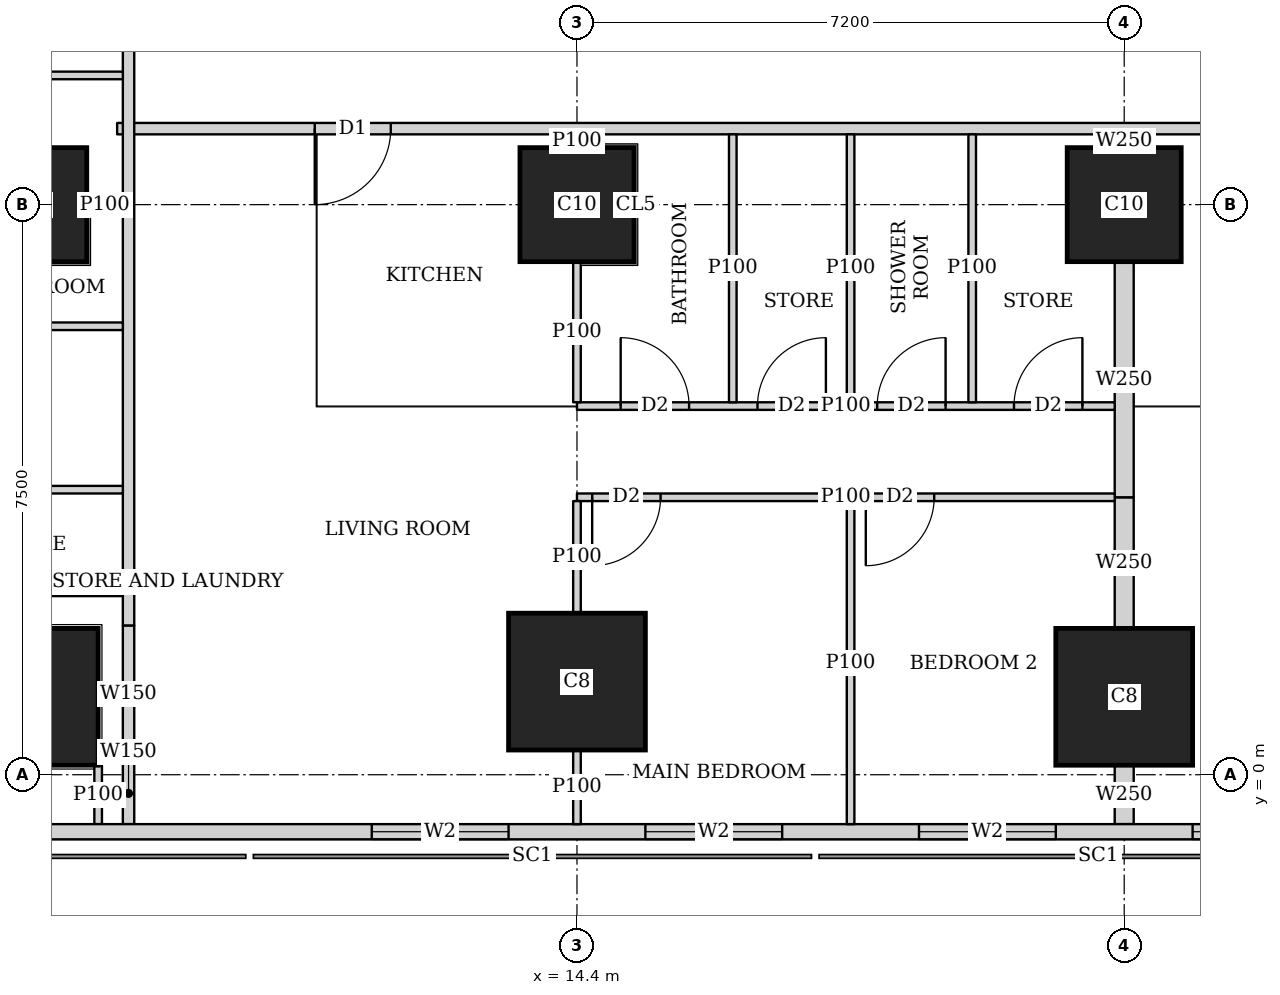
"""IFC4 building model, lengths in metres.
Left out: names, types, materials, properties, quantities, classifications, styles, units other than length and angle.
Written with IfcOpenShell. Run it as: python <this file> out.ifc"""

import sys

from ifc_helpers import new_model, si_unit, direction, frame, frame_2d, origin, origin_2d, place, context, subcontext, project, spatial, rectangle, extrude, element, fill, save


model = new_model("IFC4")
c1 = context("Model", 3, precision=1e-05, world=origin(), true_north=direction((0.0, 1.0)))
c2 = subcontext(c1, "Body", "Model", "MODEL_VIEW")
j1 = project(units=[si_unit("LENGTHUNIT", "METRE"), si_unit("PLANEANGLEUNIT", "RADIAN")], contexts=[c1])
p1 = place(None, origin())
s1 = spatial("IfcSite", under=j1, at=p1, CompositionType="ELEMENT")
p2 = place(p1, origin())
s2 = spatial("IfcBuilding", under=s1, at=p2, CompositionType="ELEMENT")
p3 = place(p2, frame((0.0, 0.0, 180.8)))
s3 = spatial("IfcBuildingStorey", under=s2, at=p3, CompositionType="ELEMENT", Elevation=180.8)
for number, where, z_axis, x_axis in (
    (1, (7.2, 1.025, 0.0), (0.0, 0.0, 1.0), (1.0, 0.0, 0.0)),
    (2, (14.4, 1.225, 0.0), (0.0, 0.0, 1.0), (1.0, 0.0, 0.0)),
    (3, (21.6, 1.025, 0.0), (0.0, 0.0, 1.0), (1.0, 0.0, 0.0)),
):
    element("IfcColumn", number, at=place(p3, frame(where, z_axis=z_axis, x_axis=x_axis)), inside=s3, PredefinedType="COLUMN", context=c2, shape_type="SweptSolid", body=[
        extrude(rectangle(XDim=1.8, YDim=1.8, at=origin_2d()), origin(), (0.0, 0.0, 1.0), 3.75),
    ])
for number, where, z_axis, x_axis in (
    (4, (7.2, 7.5, 0.0), (0.0, 0.0, 1.0), (1.0, 0.0, 0.0)),
    (5, (14.4, 7.5, 0.0), (0.0, 0.0, 1.0), (1.0, 0.0, 0.0)),
    (6, (21.6, 7.5, 0.0), (0.0, 0.0, 1.0), (1.0, 0.0, 0.0)),
):
    element("IfcColumn", number, at=place(p3, frame(where, z_axis=z_axis, x_axis=x_axis)), inside=s3, PredefinedType="COLUMN", context=c2, shape_type="SweptSolid", body=[
        extrude(rectangle(XDim=1.5, YDim=1.5, at=origin_2d()), origin(), (0.0, 0.0, 1.0), 3.75),
    ])
p4 = place(p3, frame((2.163, -0.75, 0.0), z_axis=(0.0, 0.0, 1.0), x_axis=(1.0, 0.0, 0.0)))
e7 = element("IfcWall", 7, at=p4, inside=s3, PredefinedType="SOLIDWALL", context=c2, shape_type="SweptSolid", body=[
    extrude(rectangle(XDim=45.628, YDim=0.2, at=frame_2d((22.814, 0.0))), origin(), (0.0, 0.0, 1.0), 3.5),
])
p5 = place(p4, frame((9.537, 0.0, 0.9)))
e8 = element("IfcOpeningElement", 8, at=p5, cuts=e7, PredefinedType="OPENING", context=c2, shape_type="SweptSolid", body=[
    extrude(rectangle(XDim=1.8, YDim=1.5, at=frame_2d((0.9, 0.75))), frame((0.0, 0.11, 0.0), z_axis=(0.0, -1.0, 0.0), x_axis=(1.0, 0.0, 0.0)), (0.0, 0.0, 1.0), 0.22),
])
p6 = place(p4, frame((13.137, 0.0, 0.9)))
e9 = element("IfcOpeningElement", 9, at=p6, cuts=e7, PredefinedType="OPENING", context=c2, shape_type="SweptSolid", body=[
    extrude(rectangle(XDim=1.8, YDim=1.5, at=frame_2d((0.9, 0.75))), frame((0.0, 0.11, 0.0), z_axis=(0.0, -1.0, 0.0), x_axis=(1.0, 0.0, 0.0)), (0.0, 0.0, 1.0), 0.22),
])
p7 = place(p4, frame((16.737, 0.0, 0.9)))
e10 = element("IfcOpeningElement", 10, at=p7, cuts=e7, PredefinedType="OPENING", context=c2, shape_type="SweptSolid", body=[
    extrude(rectangle(XDim=1.8, YDim=1.5, at=frame_2d((0.9, 0.75))), frame((0.0, 0.11, 0.0), z_axis=(0.0, -1.0, 0.0), x_axis=(1.0, 0.0, 0.0)), (0.0, 0.0, 1.0), 0.22),
])
p8 = place(p4, frame((20.337, 0.0, 0.9)))
e11 = element("IfcOpeningElement", 11, at=p8, cuts=e7, PredefinedType="OPENING", context=c2, shape_type="SweptSolid", body=[
    extrude(rectangle(XDim=1.8, YDim=1.5, at=frame_2d((0.9, 0.75))), frame((0.0, 0.11, 0.0), z_axis=(0.0, -1.0, 0.0), x_axis=(1.0, 0.0, 0.0)), (0.0, 0.0, 1.0), 0.22),
])
p9 = place(p4, frame((23.937, 0.0, 0.9)))
e12 = element("IfcOpeningElement", 12, at=p9, cuts=e7, PredefinedType="OPENING", context=c2, shape_type="SweptSolid", body=[
    extrude(rectangle(XDim=1.8, YDim=1.5, at=frame_2d((0.9, 0.75))), frame((0.0, 0.11, 0.0), z_axis=(0.0, -1.0, 0.0), x_axis=(1.0, 0.0, 0.0)), (0.0, 0.0, 1.0), 0.22),
])
p10 = place(p4, frame((27.537, 0.0, 0.9)))
e13 = element("IfcOpeningElement", 13, at=p10, cuts=e7, PredefinedType="OPENING", context=c2, shape_type="SweptSolid", body=[
    extrude(rectangle(XDim=1.8, YDim=1.5, at=frame_2d((0.9, 0.75))), frame((0.0, 0.11, 0.0), z_axis=(0.0, -1.0, 0.0), x_axis=(1.0, 0.0, 0.0)), (0.0, 0.0, 1.0), 0.22),
])
p11 = place(p4, frame((31.137, 0.0, 0.9)))
e14 = element("IfcOpeningElement", 14, at=p11, cuts=e7, PredefinedType="OPENING", context=c2, shape_type="SweptSolid", body=[
    extrude(rectangle(XDim=1.8, YDim=1.5, at=frame_2d((0.9, 0.75))), frame((0.0, 0.11, 0.0), z_axis=(0.0, -1.0, 0.0), x_axis=(1.0, 0.0, 0.0)), (0.0, 0.0, 1.0), 0.22),
])
p12 = place(p4, frame((34.737, 0.0, 0.9)))
e15 = element("IfcOpeningElement", 15, at=p12, cuts=e7, PredefinedType="OPENING", context=c2, shape_type="SweptSolid", body=[
    extrude(rectangle(XDim=1.8, YDim=1.5, at=frame_2d((0.9, 0.75))), frame((0.0, 0.11, 0.0), z_axis=(0.0, -1.0, 0.0), x_axis=(1.0, 0.0, 0.0)), (0.0, 0.0, 1.0), 0.22),
])
p13 = place(p3, frame((8.5, -0.65, 0.0), z_axis=(0.0, 0.0, 1.0), x_axis=(0.0, 1.0, 0.0)))
e16 = element("IfcWall", 16, at=p13, inside=s3, PredefinedType="SOLIDWALL", context=c2, shape_type="SweptSolid", body=[
    extrude(rectangle(XDim=0.809, YDim=0.15, at=frame_2d((0.404, 0.0))), origin(), (0.0, 0.0, 1.0), 3.5),
])
p14 = place(p3, frame((8.5, 0.159, 0.0), z_axis=(0.0, 0.0, 1.0), x_axis=(0.0, 1.0, 0.0)))
e17 = element("IfcWall", 17, at=p14, inside=s3, PredefinedType="SOLIDWALL", context=c2, shape_type="SweptSolid", body=[
    extrude(rectangle(XDim=1.805, YDim=0.15, at=frame_2d((0.903, 0.0))), origin(), (0.0, 0.0, 1.0), 2.1),
])
p15 = place(p3, frame((8.5, 1.964, 0.0), z_axis=(0.0, 0.0, 1.0), x_axis=(0.0, 1.0, 0.0)))
e18 = element("IfcWall", 18, at=p15, inside=s3, PredefinedType="SOLIDWALL", context=c2, shape_type="SweptSolid", body=[
    extrude(rectangle(XDim=41.097, YDim=0.15, at=frame_2d((20.548, 0.0))), origin(), (0.0, 0.0, 1.0), 3.5),
])
p16 = place(p15, frame((10.661, 0.0, 0.0)))
e19 = element("IfcOpeningElement", 19, at=p16, cuts=e18, PredefinedType="OPENING", context=c2, shape_type="SweptSolid", body=[
    extrude(rectangle(XDim=1.0, YDim=2.1, at=frame_2d((0.5, 1.05))), frame((0.0, 0.085, 0.0), z_axis=(0.0, -1.0, 0.0), x_axis=(1.0, 0.0, 0.0)), (0.0, 0.0, 1.0), 0.17),
])
p17 = place(p15, frame((14.411, 0.0, 0.0)))
e20 = element("IfcOpeningElement", 20, at=p17, cuts=e18, PredefinedType="OPENING", context=c2, shape_type="SweptSolid", body=[
    extrude(rectangle(XDim=1.0, YDim=2.1, at=frame_2d((0.5, 1.05))), frame((0.0, 0.085, 0.0), z_axis=(0.0, -1.0, 0.0), x_axis=(1.0, 0.0, 0.0)), (0.0, 0.0, 1.0), 0.17),
])
p18 = place(p15, frame((21.911, 0.0, 0.0)))
e21 = element("IfcOpeningElement", 21, at=p18, cuts=e18, PredefinedType="OPENING", context=c2, shape_type="SweptSolid", body=[
    extrude(rectangle(XDim=1.0, YDim=2.1, at=frame_2d((0.5, 1.05))), frame((0.0, 0.085, 0.0), z_axis=(0.0, -1.0, 0.0), x_axis=(1.0, 0.0, 0.0)), (0.0, 0.0, 1.0), 0.17),
])
p19 = place(p15, frame((33.161, 0.0, 0.0)))
e22 = element("IfcOpeningElement", 22, at=p19, cuts=e18, PredefinedType="OPENING", context=c2, shape_type="SweptSolid", body=[
    extrude(rectangle(XDim=1.0, YDim=2.1, at=frame_2d((0.5, 1.05))), frame((0.0, 0.085, 0.0), z_axis=(0.0, -1.0, 0.0), x_axis=(1.0, 0.0, 0.0)), (0.0, 0.0, 1.0), 0.17),
])
p20 = place(p3, frame((40.053, 8.5, 0.0), z_axis=(0.0, 0.0, 1.0), x_axis=(-1.0, 0.0, 0.0)))
e23 = element("IfcWall", 23, at=p20, inside=s3, PredefinedType="SOLIDWALL", context=c2, shape_type="SweptSolid", body=[
    extrude(rectangle(XDim=31.703, YDim=0.15, at=frame_2d((15.852, 0.0))), origin(), (0.0, 0.0, 1.0), 3.5),
])
p21 = place(p20, frame((28.103, 0.0, 0.0)))
e24 = element("IfcOpeningElement", 24, at=p21, cuts=e23, PredefinedType="OPENING", context=c2, shape_type="SweptSolid", body=[
    extrude(rectangle(XDim=1.0, YDim=2.1, at=frame_2d((0.5, 1.05))), frame((0.0, 0.085, 0.0), z_axis=(0.0, -1.0, 0.0), x_axis=(1.0, 0.0, 0.0)), (0.0, 0.0, 1.0), 0.17),
])
p22 = place(p20, frame((15.953, 0.0, 0.0)))
e25 = element("IfcOpeningElement", 25, at=p22, cuts=e23, PredefinedType="OPENING", context=c2, shape_type="SweptSolid", body=[
    extrude(rectangle(XDim=1.0, YDim=2.1, at=frame_2d((0.5, 1.05))), frame((0.0, 0.085, 0.0), z_axis=(0.0, -1.0, 0.0), x_axis=(1.0, 0.0, 0.0)), (0.0, 0.0, 1.0), 0.17),
])
p23 = place(p20, frame((8.753, 0.0, 0.0)))
e26 = element("IfcOpeningElement", 26, at=p23, cuts=e23, PredefinedType="OPENING", context=c2, shape_type="SweptSolid", body=[
    extrude(rectangle(XDim=1.0, YDim=2.1, at=frame_2d((0.5, 1.05))), frame((0.0, 0.085, 0.0), z_axis=(0.0, -1.0, 0.0), x_axis=(1.0, 0.0, 0.0)), (0.0, 0.0, 1.0), 0.17),
])
p24 = place(p3, frame((8.1, 0.124, 0.0), z_axis=(0.0, 0.0, 1.0), x_axis=(0.0, -1.0, 0.0)))
e27 = element("IfcWall", 27, at=p24, inside=s3, PredefinedType="PARTITIONING", context=c2, shape_type="SweptSolid", body=[
    extrude(rectangle(XDim=0.774, YDim=0.1, at=frame_2d((0.387, 0.0))), origin(), (0.0, 0.0, 1.0), 3.5),
])
p25 = place(p3, frame((4.9, 3.75, 0.0), z_axis=(0.0, 0.0, 1.0), x_axis=(1.0, 0.0, 0.0)))
e28 = element("IfcWall", 28, at=p25, inside=s3, PredefinedType="PARTITIONING", context=c2, shape_type="SweptSolid", body=[
    extrude(rectangle(XDim=3.525, YDim=0.1, at=frame_2d((1.763, 0.0))), origin(), (0.0, 0.0, 1.0), 3.5),
])
p26 = place(p3, frame((7.951, 7.5, 0.0), z_axis=(0.0, 0.0, 1.0), x_axis=(1.0, 0.0, 0.0)))
e29 = element("IfcWall", 29, at=p26, inside=s3, PredefinedType="PARTITIONING", context=c2, shape_type="SweptSolid", body=[
    extrude(rectangle(XDim=0.474, YDim=0.1, at=frame_2d((0.237, 0.0))), origin(), (0.0, 0.0, 1.0), 3.5),
])
for number, where, z_axis, x_axis in (
    (30, (4.9, 9.2, 0.0), (0.0, 0.0, 1.0), (1.0, 0.0, 0.0)),
    (31, (4.9, 5.9, 0.0), (0.0, 0.0, 1.0), (1.0, 0.0, 0.0)),
):
    element("IfcWall", number, at=place(p3, frame(where, z_axis=z_axis, x_axis=x_axis)), inside=s3, PredefinedType="PARTITIONING", context=c2, shape_type="SweptSolid", body=[
        extrude(rectangle(XDim=3.525, YDim=0.1, at=frame_2d((1.763, 0.0))), origin(), (0.0, 0.0, 1.0), 3.5),
    ])
p27 = place(p3, frame((21.475, 3.65, 0.0), z_axis=(0.0, 0.0, 1.0), x_axis=(-1.0, 0.0, 0.0)))
e32 = element("IfcWall", 32, at=p27, inside=s3, PredefinedType="PARTITIONING", context=c2, shape_type="SweptSolid", body=[
    extrude(rectangle(XDim=7.075, YDim=0.1, at=frame_2d((3.538, 0.0))), origin(), (0.0, 0.0, 1.0), 3.5),
])
p28 = place(p27, frame((5.975, 0.0, 0.0)))
e33 = element("IfcOpeningElement", 33, at=p28, cuts=e32, PredefinedType="OPENING", context=c2, shape_type="SweptSolid", body=[
    extrude(rectangle(XDim=0.9, YDim=2.1, at=frame_2d((0.45, 1.05))), frame((0.0, 0.06, 0.0), z_axis=(0.0, -1.0, 0.0), x_axis=(1.0, 0.0, 0.0)), (0.0, 0.0, 1.0), 0.12),
])
p29 = place(p27, frame((2.375, 0.0, 0.0)))
e34 = element("IfcOpeningElement", 34, at=p29, cuts=e32, PredefinedType="OPENING", context=c2, shape_type="SweptSolid", body=[
    extrude(rectangle(XDim=0.9, YDim=2.1, at=frame_2d((0.45, 1.05))), frame((0.0, 0.06, 0.0), z_axis=(0.0, -1.0, 0.0), x_axis=(1.0, 0.0, 0.0)), (0.0, 0.0, 1.0), 0.12),
])
p30 = place(p3, frame((21.475, 4.85, 0.0), z_axis=(0.0, 0.0, 1.0), x_axis=(-1.0, 0.0, 0.0)))
e35 = element("IfcWall", 35, at=p30, inside=s3, PredefinedType="PARTITIONING", context=c2, shape_type="SweptSolid", body=[
    extrude(rectangle(XDim=7.075, YDim=0.1, at=frame_2d((3.538, 0.0))), origin(), (0.0, 0.0, 1.0), 3.5),
])
p31 = place(p30, frame((5.6, 0.0, 0.0)))
e36 = element("IfcOpeningElement", 36, at=p31, cuts=e35, PredefinedType="OPENING", context=c2, shape_type="SweptSolid", body=[
    extrude(rectangle(XDim=0.9, YDim=2.1, at=frame_2d((0.45, 1.05))), frame((0.0, 0.06, 0.0), z_axis=(0.0, -1.0, 0.0), x_axis=(1.0, 0.0, 0.0)), (0.0, 0.0, 1.0), 0.12),
])
p32 = place(p30, frame((2.225, 0.0, 0.0)))
e37 = element("IfcOpeningElement", 37, at=p32, cuts=e35, PredefinedType="OPENING", context=c2, shape_type="SweptSolid", body=[
    extrude(rectangle(XDim=0.9, YDim=2.1, at=frame_2d((0.45, 1.05))), frame((0.0, 0.06, 0.0), z_axis=(0.0, -1.0, 0.0), x_axis=(1.0, 0.0, 0.0)), (0.0, 0.0, 1.0), 0.12),
])
p33 = place(p30, frame((3.8, 0.0, 0.0)))
e38 = element("IfcOpeningElement", 38, at=p33, cuts=e35, PredefinedType="OPENING", context=c2, shape_type="SweptSolid", body=[
    extrude(rectangle(XDim=0.9, YDim=2.1, at=frame_2d((0.45, 1.05))), frame((0.0, 0.06, 0.0), z_axis=(0.0, -1.0, 0.0), x_axis=(1.0, 0.0, 0.0)), (0.0, 0.0, 1.0), 0.12),
])
p34 = place(p30, frame((0.425, 0.0, 0.0)))
e39 = element("IfcOpeningElement", 39, at=p34, cuts=e35, PredefinedType="OPENING", context=c2, shape_type="SweptSolid", body=[
    extrude(rectangle(XDim=0.9, YDim=2.1, at=frame_2d((0.45, 1.05))), frame((0.0, 0.06, 0.0), z_axis=(0.0, -1.0, 0.0), x_axis=(1.0, 0.0, 0.0)), (0.0, 0.0, 1.0), 0.12),
])
p35 = place(p3, frame((14.4, -0.65, 0.0), z_axis=(0.0, 0.0, 1.0), x_axis=(0.0, 1.0, 0.0)))
e40 = element("IfcWall", 40, at=p35, inside=s3, PredefinedType="PARTITIONING", context=c2, shape_type="SweptSolid", body=[
    extrude(rectangle(XDim=0.974, YDim=0.1, at=frame_2d((0.487, 0.0))), origin(), (0.0, 0.0, 1.0), 3.5),
])
p36 = place(p3, frame((14.4, 2.126, 0.0), z_axis=(0.0, 0.0, 1.0), x_axis=(0.0, 1.0, 0.0)))
e41 = element("IfcWall", 41, at=p36, inside=s3, PredefinedType="PARTITIONING", context=c2, shape_type="SweptSolid", body=[
    extrude(rectangle(XDim=1.474, YDim=0.1, at=frame_2d((0.737, 0.0))), origin(), (0.0, 0.0, 1.0), 3.5),
])
p37 = place(p3, frame((18.0, -0.65, 0.0), z_axis=(0.0, 0.0, 1.0), x_axis=(0.0, 1.0, 0.0)))
e42 = element("IfcWall", 42, at=p37, inside=s3, PredefinedType="PARTITIONING", context=c2, shape_type="SweptSolid", body=[
    extrude(rectangle(XDim=4.25, YDim=0.1, at=frame_2d((2.125, 0.0))), origin(), (0.0, 0.0, 1.0), 2.1),
])
p38 = place(p3, frame((14.4, 4.9, 0.0), z_axis=(0.0, 0.0, 1.0), x_axis=(0.0, 1.0, 0.0)))
e43 = element("IfcWall", 43, at=p38, inside=s3, PredefinedType="PARTITIONING", context=c2, shape_type="SweptSolid", body=[
    extrude(rectangle(XDim=1.849, YDim=0.1, at=frame_2d((0.925, 0.0))), origin(), (0.0, 0.0, 1.0), 3.5),
])
p39 = place(p3, frame((14.4, 8.251, 0.0), z_axis=(0.0, 0.0, 1.0), x_axis=(0.0, 1.0, 0.0)))
e44 = element("IfcWall", 44, at=p39, inside=s3, PredefinedType="PARTITIONING", context=c2, shape_type="SweptSolid", body=[
    extrude(rectangle(XDim=0.174, YDim=0.1, at=frame_2d((0.087, 0.0))), origin(), (0.0, 0.0, 1.0), 3.5),
])
for number, where, z_axis, x_axis in (
    (45, (18.0, 4.9, 0.0), (0.0, 0.0, 1.0), (0.0, 1.0, 0.0)),
    (46, (16.45, 4.9, 0.0), (0.0, 0.0, 1.0), (0.0, 1.0, 0.0)),
    (47, (19.6, 4.9, 0.0), (0.0, 0.0, 1.0), (0.0, 1.0, 0.0)),
):
    element("IfcWall", number, at=place(p3, frame(where, z_axis=z_axis, x_axis=x_axis)), inside=s3, PredefinedType="PARTITIONING", context=c2, shape_type="SweptSolid", body=[
        extrude(rectangle(XDim=3.525, YDim=0.1, at=frame_2d((1.763, 0.0))), origin(), (0.0, 0.0, 1.0), 3.5),
    ])
p40 = place(p3, frame((21.6, -0.65, 0.0), z_axis=(0.0, 0.0, 1.0), x_axis=(0.0, 1.0, 0.0)))
e48 = element("IfcWall", 48, at=p40, inside=s3, PredefinedType="SOLIDWALL", context=c2, shape_type="SweptSolid", body=[
    extrude(rectangle(XDim=0.774, YDim=0.25, at=frame_2d((0.387, 0.0))), origin(), (0.0, 0.0, 1.0), 2.1),
])
p41 = place(p3, frame((21.6, 1.926, 0.0), z_axis=(0.0, 0.0, 1.0), x_axis=(0.0, 1.0, 0.0)))
e49 = element("IfcWall", 49, at=p41, inside=s3, PredefinedType="SOLIDWALL", context=c2, shape_type="SweptSolid", body=[
    extrude(rectangle(XDim=1.724, YDim=0.25, at=frame_2d((0.862, 0.0))), origin(), (0.0, 0.0, 1.0), 2.1),
])
p42 = place(p3, frame((21.6, 3.65, 0.0), z_axis=(0.0, 0.0, 1.0), x_axis=(0.0, 1.0, 0.0)))
e50 = element("IfcWall", 50, at=p42, inside=s3, PredefinedType="SOLIDWALL", context=c2, shape_type="SweptSolid", body=[
    extrude(rectangle(XDim=3.099, YDim=0.25, at=frame_2d((1.55, 0.0))), origin(), (0.0, 0.0, 1.0), 3.5),
])
p43 = place(p3, frame((21.6, 8.251, 0.0), z_axis=(0.0, 0.0, 1.0), x_axis=(0.0, 1.0, 0.0)))
e51 = element("IfcWall", 51, at=p43, inside=s3, PredefinedType="SOLIDWALL", context=c2, shape_type="SweptSolid", body=[
    extrude(rectangle(XDim=0.174, YDim=0.25, at=frame_2d((0.087, 0.0))), origin(), (0.0, 0.0, 1.0), 3.5),
])
p44 = place(p3, frame((5.467, 2.4, 0.0), z_axis=(0.0, 0.0, 1.0), x_axis=(1.0, 0.0, 0.0)))
e52 = element("IfcWall", 52, at=p44, inside=s3, PredefinedType="PARTITIONING", context=c2, shape_type="SweptSolid", body=[
    extrude(rectangle(XDim=2.958, YDim=0.1, at=frame_2d((1.479, 0.0))), origin(), (0.0, 0.0, 1.0), 3.5),
])
p45 = place(p44, frame((0.108, 0.0, 0.0)))
e53 = element("IfcOpeningElement", 53, at=p45, cuts=e52, PredefinedType="OPENING", context=c2, shape_type="SweptSolid", body=[
    extrude(rectangle(XDim=0.9, YDim=2.1, at=frame_2d((0.45, 1.05))), frame((0.0, 0.06, 0.0), z_axis=(0.0, -1.0, 0.0), x_axis=(1.0, 0.0, 0.0)), (0.0, 0.0, 1.0), 0.12),
])
p46 = place(p5, origin())
e54 = element("IfcWindow", 54, at=p46, inside=s3, PartitioningType="SINGLE_PANEL", PredefinedType="WINDOW", context=c2, shape_type="SweptSolid", body=[
    extrude(rectangle(XDim=1.8, YDim=1.5, at=frame_2d((0.9, 0.75))), frame((0.0, 0.03, 0.0), z_axis=(0.0, -1.0, 0.0), x_axis=(1.0, 0.0, 0.0)), (0.0, 0.0, 1.0), 0.06),
])
fill(e8, e54)
p47 = place(p6, origin())
e55 = element("IfcWindow", 55, at=p47, inside=s3, PartitioningType="SINGLE_PANEL", PredefinedType="WINDOW", context=c2, shape_type="SweptSolid", body=[
    extrude(rectangle(XDim=1.8, YDim=1.5, at=frame_2d((0.9, 0.75))), frame((0.0, 0.03, 0.0), z_axis=(0.0, -1.0, 0.0), x_axis=(1.0, 0.0, 0.0)), (0.0, 0.0, 1.0), 0.06),
])
fill(e9, e55)
p48 = place(p7, origin())
e56 = element("IfcWindow", 56, at=p48, inside=s3, PartitioningType="SINGLE_PANEL", PredefinedType="WINDOW", context=c2, shape_type="SweptSolid", body=[
    extrude(rectangle(XDim=1.8, YDim=1.5, at=frame_2d((0.9, 0.75))), frame((0.0, 0.03, 0.0), z_axis=(0.0, -1.0, 0.0), x_axis=(1.0, 0.0, 0.0)), (0.0, 0.0, 1.0), 0.06),
])
fill(e10, e56)
p49 = place(p8, origin())
e57 = element("IfcWindow", 57, at=p49, inside=s3, PartitioningType="SINGLE_PANEL", PredefinedType="WINDOW", context=c2, shape_type="SweptSolid", body=[
    extrude(rectangle(XDim=1.8, YDim=1.5, at=frame_2d((0.9, 0.75))), frame((0.0, 0.03, 0.0), z_axis=(0.0, -1.0, 0.0), x_axis=(1.0, 0.0, 0.0)), (0.0, 0.0, 1.0), 0.06),
])
fill(e11, e57)
p50 = place(p28, origin())
e58 = element("IfcDoor", 58, at=p50, inside=s3, OperationType="SINGLE_SWING_RIGHT", PredefinedType="DOOR", context=c2, shape_type="SweptSolid", body=[
    extrude(rectangle(XDim=0.9, YDim=2.1, at=frame_2d((0.45, 1.05))), frame((0.0, 0.025, 0.0), z_axis=(0.0, -1.0, 0.0), x_axis=(1.0, 0.0, 0.0)), (0.0, 0.0, 1.0), 0.05),
])
fill(e33, e58)
p51 = place(p29, origin())
e59 = element("IfcDoor", 59, at=p51, inside=s3, OperationType="SINGLE_SWING_RIGHT", PredefinedType="DOOR", context=c2, shape_type="SweptSolid", body=[
    extrude(rectangle(XDim=0.9, YDim=2.1, at=frame_2d((0.45, 1.05))), frame((0.0, 0.025, 0.0), z_axis=(0.0, -1.0, 0.0), x_axis=(1.0, 0.0, 0.0)), (0.0, 0.0, 1.0), 0.05),
])
fill(e34, e59)
p52 = place(p31, origin())
e60 = element("IfcDoor", 60, at=p52, inside=s3, OperationType="SINGLE_SWING_LEFT", PredefinedType="DOOR", context=c2, shape_type="SweptSolid", body=[
    extrude(rectangle(XDim=0.9, YDim=2.1, at=frame_2d((0.45, 1.05))), frame((0.0, 0.025, 0.0), z_axis=(0.0, -1.0, 0.0), x_axis=(1.0, 0.0, 0.0)), (0.0, 0.0, 1.0), 0.05),
])
fill(e36, e60)
p53 = place(p32, origin())
e61 = element("IfcDoor", 61, at=p53, inside=s3, OperationType="SINGLE_SWING_RIGHT", PredefinedType="DOOR", context=c2, shape_type="SweptSolid", body=[
    extrude(rectangle(XDim=0.9, YDim=2.1, at=frame_2d((0.45, 1.05))), frame((0.0, 0.025, 0.0), z_axis=(0.0, -1.0, 0.0), x_axis=(1.0, 0.0, 0.0)), (0.0, 0.0, 1.0), 0.05),
])
fill(e37, e61)
p54 = place(p33, origin())
e62 = element("IfcDoor", 62, at=p54, inside=s3, OperationType="SINGLE_SWING_RIGHT", PredefinedType="DOOR", context=c2, shape_type="SweptSolid", body=[
    extrude(rectangle(XDim=0.9, YDim=2.1, at=frame_2d((0.45, 1.05))), frame((0.0, 0.025, 0.0), z_axis=(0.0, -1.0, 0.0), x_axis=(1.0, 0.0, 0.0)), (0.0, 0.0, 1.0), 0.05),
])
fill(e38, e62)
p55 = place(p34, origin())
e63 = element("IfcDoor", 63, at=p55, inside=s3, OperationType="SINGLE_SWING_RIGHT", PredefinedType="DOOR", context=c2, shape_type="SweptSolid", body=[
    extrude(rectangle(XDim=0.9, YDim=2.1, at=frame_2d((0.45, 1.05))), frame((0.0, 0.025, 0.0), z_axis=(0.0, -1.0, 0.0), x_axis=(1.0, 0.0, 0.0)), (0.0, 0.0, 1.0), 0.05),
])
fill(e39, e63)
p56 = place(p21, origin())
e64 = element("IfcDoor", 64, at=p56, inside=s3, OperationType="SINGLE_SWING_RIGHT", PredefinedType="DOOR", context=c2, shape_type="SweptSolid", body=[
    extrude(rectangle(XDim=1.0, YDim=2.1, at=frame_2d((0.5, 1.05))), frame((0.0, 0.025, 0.0), z_axis=(0.0, -1.0, 0.0), x_axis=(1.0, 0.0, 0.0)), (0.0, 0.0, 1.0), 0.05),
])
fill(e24, e64)
save(model, sys.argv[1])
